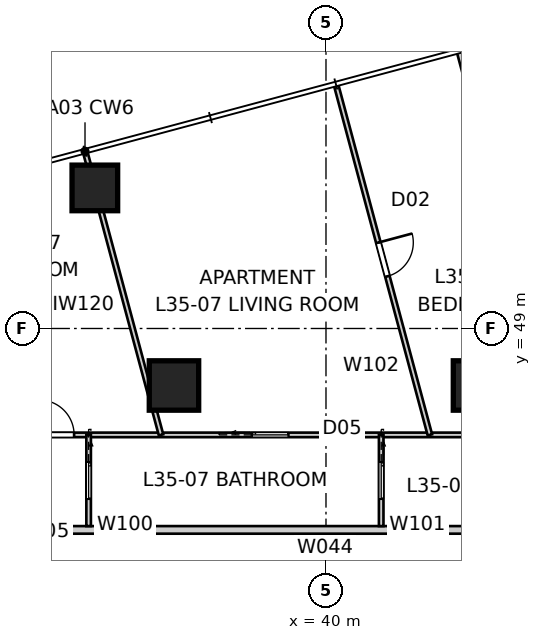
"""IFC4 building model, lengths in metres.
Left out: names, types, materials, properties, quantities, classifications, styles, units other than length and angle.
Written with IfcOpenShell. Run it as: python <this file> out.ifc"""

import sys

from ifc_helpers import new_model, si_unit, direction, frame, frame_2d, origin, origin_2d, place, context, subcontext, project, spatial, rectangle, extrude, element, fill, save


model = new_model("IFC4")
c1 = context("Model", 3, precision=1e-05, world=origin(), true_north=direction((0.0, 1.0)))
c2 = subcontext(c1, "Body", "Model", "MODEL_VIEW")
j1 = project(units=[si_unit("LENGTHUNIT", "METRE"), si_unit("PLANEANGLEUNIT", "RADIAN")], contexts=[c1])
p1 = place(None, origin())
s1 = spatial("IfcSite", under=j1, at=p1, CompositionType="ELEMENT")
p2 = place(p1, origin())
s2 = spatial("IfcBuilding", under=s1, at=p2, CompositionType="ELEMENT")
p3 = place(p2, frame((0.0, 0.0, 128.6)))
s3 = spatial("IfcBuildingStorey", under=s2, at=p3, CompositionType="ELEMENT", Elevation=128.6)
p4 = place(p3, frame((33.918, 52.699, 0.0), z_axis=(0.0, 0.0, 1.0), x_axis=(1.0, 0.0, 0.0)))
e1 = element("IfcColumn", 1, at=p4, inside=s3, PredefinedType="COLUMN", context=c2, shape_type="SweptSolid", body=[
    extrude(rectangle(XDim=1.2, YDim=1.2, at=origin_2d()), origin(), (0.0, 0.0, 1.0), 3.4),
])
for number, where, z_axis, x_axis in (
    (2, (44.0, 47.5, 0.0), (0.0, 0.0, 1.0), (1.0, 0.0, 0.0)),
    (3, (36.0, 47.5, 0.0), (0.0, 0.0, 1.0), (1.0, 0.0, 0.0)),
):
    element("IfcColumn", number, at=place(p3, frame(where, z_axis=z_axis, x_axis=x_axis)), inside=s3, PredefinedType="COLUMN", context=c2, shape_type="SweptSolid", body=[
        extrude(rectangle(XDim=1.3, YDim=1.3, at=origin_2d()), origin(), (0.0, 0.0, 1.0), 3.4),
    ])
p5 = place(p3, frame((52.52, 43.7, 0.0), z_axis=(0.0, 0.0, 1.0), x_axis=(-1.0, 0.0, 0.0)))
e4 = element("IfcWall", 4, at=p5, inside=s3, PredefinedType="PARTITIONING", context=c2, shape_type="SweptSolid", body=[
    extrude(rectangle(XDim=27.02, YDim=0.2, at=frame_2d((13.51, 0.0))), origin(), (0.0, 0.0, 1.0), 3.25),
])
p6 = place(p5, frame((22.208, 0.0, 0.0)))
e5 = element("IfcOpeningElement", 5, at=p6, cuts=e4, PredefinedType="OPENING", context=c2, shape_type="SweptSolid", body=[
    extrude(rectangle(XDim=1.02, YDim=2.34, at=frame_2d((0.51, 1.17))), frame((0.0, 0.11, 0.0), z_axis=(0.0, -1.0, 0.0), x_axis=(1.0, 0.0, 0.0)), (0.0, 0.0, 1.0), 0.22),
])
p7 = place(p5, frame((1.856, 0.0, 0.0)))
e6 = element("IfcOpeningElement", 6, at=p7, cuts=e4, PredefinedType="OPENING", context=c2, shape_type="SweptSolid", body=[
    extrude(rectangle(XDim=1.02, YDim=2.34, at=frame_2d((0.51, 1.17))), frame((0.0, 0.11, 0.0), z_axis=(0.0, -1.0, 0.0), x_axis=(1.0, 0.0, 0.0)), (0.0, 0.0, 1.0), 0.22),
])
p8 = place(p3, frame((43.56, 56.318, 0.0), z_axis=(0.0, 0.0, 1.0), x_axis=(0.258822671559, -0.965924854576, 0.0)))
e7 = element("IfcWall", 7, at=p8, inside=s3, PredefinedType="PARTITIONING", context=c2, shape_type="SweptSolid", body=[
    extrude(rectangle(XDim=12.966, YDim=0.25, at=frame_2d((6.483, 0.0))), origin(), (0.0, 0.0, 1.0), 3.25),
])
p9 = place(p3, frame((23.0, 46.2, 0.0), z_axis=(0.0, 0.0, 1.0), x_axis=(1.0, 0.0, 0.0)))
e8 = element("IfcWall", 8, at=p9, inside=s3, PredefinedType="PARTITIONING", context=c2, shape_type="SweptSolid", body=[
    extrude(rectangle(XDim=33.2, YDim=0.12, at=frame_2d((16.6, 0.0))), origin(), (0.0, 0.0, 1.0), 2.55),
])
p10 = place(p9, frame((5.844, 0.0, 0.0)))
e9 = element("IfcOpeningElement", 9, at=p10, cuts=e8, PredefinedType="OPENING", context=c2, shape_type="SweptSolid", body=[
    extrude(rectangle(XDim=0.92, YDim=2.34, at=frame_2d((0.46, 1.17))), frame((0.0, 0.07, 0.0), z_axis=(0.0, -1.0, 0.0), x_axis=(1.0, 0.0, 0.0)), (0.0, 0.0, 1.0), 0.14),
])
p11 = place(p9, frame((3.382, 0.0, 0.0)))
e10 = element("IfcOpeningElement", 10, at=p11, cuts=e8, PredefinedType="OPENING", context=c2, shape_type="SweptSolid", body=[
    extrude(rectangle(XDim=0.92, YDim=2.34, at=frame_2d((0.46, 1.17))), frame((0.0, 0.07, 0.0), z_axis=(0.0, -1.0, 0.0), x_axis=(1.0, 0.0, 0.0)), (0.0, 0.0, 1.0), 0.14),
])
p12 = place(p9, frame((9.452, 0.0, 0.0)))
e11 = element("IfcOpeningElement", 11, at=p12, cuts=e8, PredefinedType="OPENING", context=c2, shape_type="SweptSolid", body=[
    extrude(rectangle(XDim=0.92, YDim=2.34, at=frame_2d((0.46, 1.17))), frame((0.0, 0.07, 0.0), z_axis=(0.0, -1.0, 0.0), x_axis=(1.0, 0.0, 0.0)), (0.0, 0.0, 1.0), 0.14),
])
p13 = place(p9, frame((27.775, 0.0, 0.0)))
e12 = element("IfcOpeningElement", 12, at=p13, cuts=e8, PredefinedType="OPENING", context=c2, shape_type="SweptSolid", body=[
    extrude(rectangle(XDim=0.92, YDim=2.34, at=frame_2d((0.46, 1.17))), frame((0.0, 0.07, 0.0), z_axis=(0.0, -1.0, 0.0), x_axis=(1.0, 0.0, 0.0)), (0.0, 0.0, 1.0), 0.14),
])
p14 = place(p9, frame((15.05, 0.0, 0.0)))
e13 = element("IfcOpeningElement", 13, at=p14, cuts=e8, PredefinedType="OPENING", context=c2, shape_type="SweptSolid", body=[
    extrude(rectangle(XDim=0.96, YDim=2.1, at=frame_2d((0.48, 1.05))), frame((0.0, 0.07, 0.0), z_axis=(0.0, -1.0, 0.0), x_axis=(1.0, 0.0, 0.0)), (0.0, 0.0, 1.0), 0.14),
])
p15 = place(p3, frame((33.754, 46.2, 0.0), z_axis=(0.0, 0.0, 1.0), x_axis=(0.0, -1.0, 0.0)))
e14 = element("IfcWall", 14, at=p15, inside=s3, PredefinedType="PARTITIONING", context=c2, shape_type="SweptSolid", body=[
    extrude(rectangle(XDim=2.4, YDim=0.12, at=frame_2d((1.2, 0.0))), origin(), (0.0, 0.0, 1.0), 3.25),
])
p16 = place(p15, frame((0.72, 0.0, 0.0)))
e15 = element("IfcOpeningElement", 15, at=p16, cuts=e14, PredefinedType="OPENING", context=c2, shape_type="SweptSolid", body=[
    extrude(rectangle(XDim=0.96, YDim=2.1, at=frame_2d((0.48, 1.05))), frame((0.0, 0.07, 0.0), z_axis=(0.0, -1.0, 0.0), x_axis=(1.0, 0.0, 0.0)), (0.0, 0.0, 1.0), 0.14),
])
p17 = place(p3, frame((41.453, 46.2, 0.0), z_axis=(0.0, 0.0, 1.0), x_axis=(0.0, -1.0, 0.0)))
e16 = element("IfcWall", 16, at=p17, inside=s3, PredefinedType="PARTITIONING", context=c2, shape_type="SweptSolid", body=[
    extrude(rectangle(XDim=2.4, YDim=0.12, at=frame_2d((1.2, 0.0))), origin(), (0.0, 0.0, 1.0), 3.25),
])
p18 = place(p17, frame((0.72, 0.0, 0.0)))
e17 = element("IfcOpeningElement", 17, at=p18, cuts=e16, PredefinedType="OPENING", context=c2, shape_type="SweptSolid", body=[
    extrude(rectangle(XDim=0.96, YDim=2.1, at=frame_2d((0.48, 1.05))), frame((0.0, 0.07, 0.0), z_axis=(0.0, -1.0, 0.0), x_axis=(1.0, 0.0, 0.0)), (0.0, 0.0, 1.0), 0.14),
])
p19 = place(p3, frame((40.27, 55.395, 0.0), z_axis=(0.0, 0.0, 1.0), x_axis=(0.25881812666, -0.965926072385, 0.0)))
e18 = element("IfcWall", 18, at=p19, inside=s3, PredefinedType="PARTITIONING", context=c2, shape_type="SweptSolid", body=[
    extrude(rectangle(XDim=9.52, YDim=0.12, at=frame_2d((4.76, 0.0))), origin(), (0.0, 0.0, 1.0), 3.25),
])
p20 = place(p19, frame((4.28, 0.0, 0.0)))
e19 = element("IfcOpeningElement", 19, at=p20, cuts=e18, PredefinedType="OPENING", context=c2, shape_type="SweptSolid", body=[
    extrude(rectangle(XDim=0.92, YDim=2.34, at=frame_2d((0.46, 1.17))), frame((0.0, 0.07, 0.0), z_axis=(0.0, -1.0, 0.0), x_axis=(1.0, 0.0, 0.0)), (0.0, 0.0, 1.0), 0.14),
])
p21 = place(p3, frame((35.659, 46.2, 0.0), z_axis=(0.0, 0.0, 1.0), x_axis=(-0.258826555959, 0.96592381373, 0.0)))
e20 = element("IfcWall", 20, at=p21, inside=s3, PredefinedType="PARTITIONING", context=c2, shape_type="SweptSolid", body=[
    extrude(rectangle(XDim=7.688, YDim=0.12, at=frame_2d((3.844, 0.0))), origin(), (0.0, 0.0, 1.0), 3.25),
])
p22 = place(p16, origin())
e21 = element("IfcDoor", 21, at=p22, inside=s3, OperationType="SLIDING_TO_LEFT", PredefinedType="DOOR", context=c2, shape_type="SweptSolid", body=[
    extrude(rectangle(XDim=0.96, YDim=2.1, at=frame_2d((0.48, 1.05))), frame((0.0, 0.025, 0.0), z_axis=(0.0, -1.0, 0.0), x_axis=(1.0, 0.0, 0.0)), (0.0, 0.0, 1.0), 0.05),
])
fill(e15, e21)
p23 = place(p12, origin())
e22 = element("IfcDoor", 22, at=p23, inside=s3, OperationType="SINGLE_SWING_LEFT", PredefinedType="DOOR", context=c2, shape_type="SweptSolid", body=[
    extrude(rectangle(XDim=0.92, YDim=2.34, at=frame_2d((0.46, 1.17))), frame((0.0, 0.025, 0.0), z_axis=(0.0, -1.0, 0.0), x_axis=(1.0, 0.0, 0.0)), (0.0, 0.0, 1.0), 0.05),
])
fill(e11, e22)
p24 = place(p14, origin())
e23 = element("IfcDoor", 23, at=p24, inside=s3, OperationType="SLIDING_TO_LEFT", PredefinedType="DOOR", context=c2, shape_type="SweptSolid", body=[
    extrude(rectangle(XDim=0.96, YDim=2.1, at=frame_2d((0.48, 1.05))), frame((0.0, 0.025, 0.0), z_axis=(0.0, -1.0, 0.0), x_axis=(1.0, 0.0, 0.0)), (0.0, 0.0, 1.0), 0.05),
])
fill(e13, e23)
p25 = place(p18, origin())
e24 = element("IfcDoor", 24, at=p25, inside=s3, OperationType="SLIDING_TO_LEFT", PredefinedType="DOOR", context=c2, shape_type="SweptSolid", body=[
    extrude(rectangle(XDim=0.96, YDim=2.1, at=frame_2d((0.48, 1.05))), frame((0.0, 0.025, 0.0), z_axis=(0.0, -1.0, 0.0), x_axis=(1.0, 0.0, 0.0)), (0.0, 0.0, 1.0), 0.05),
])
fill(e17, e24)
p26 = place(p20, origin())
e25 = element("IfcDoor", 25, at=p26, inside=s3, OperationType="SINGLE_SWING_LEFT", PredefinedType="DOOR", context=c2, shape_type="SweptSolid", body=[
    extrude(rectangle(XDim=0.92, YDim=2.34, at=frame_2d((0.46, 1.17))), frame((0.0, 0.025, 0.0), z_axis=(0.0, -1.0, 0.0), x_axis=(1.0, 0.0, 0.0)), (0.0, 0.0, 1.0), 0.05),
])
fill(e19, e25)
save(model, sys.argv[1])
